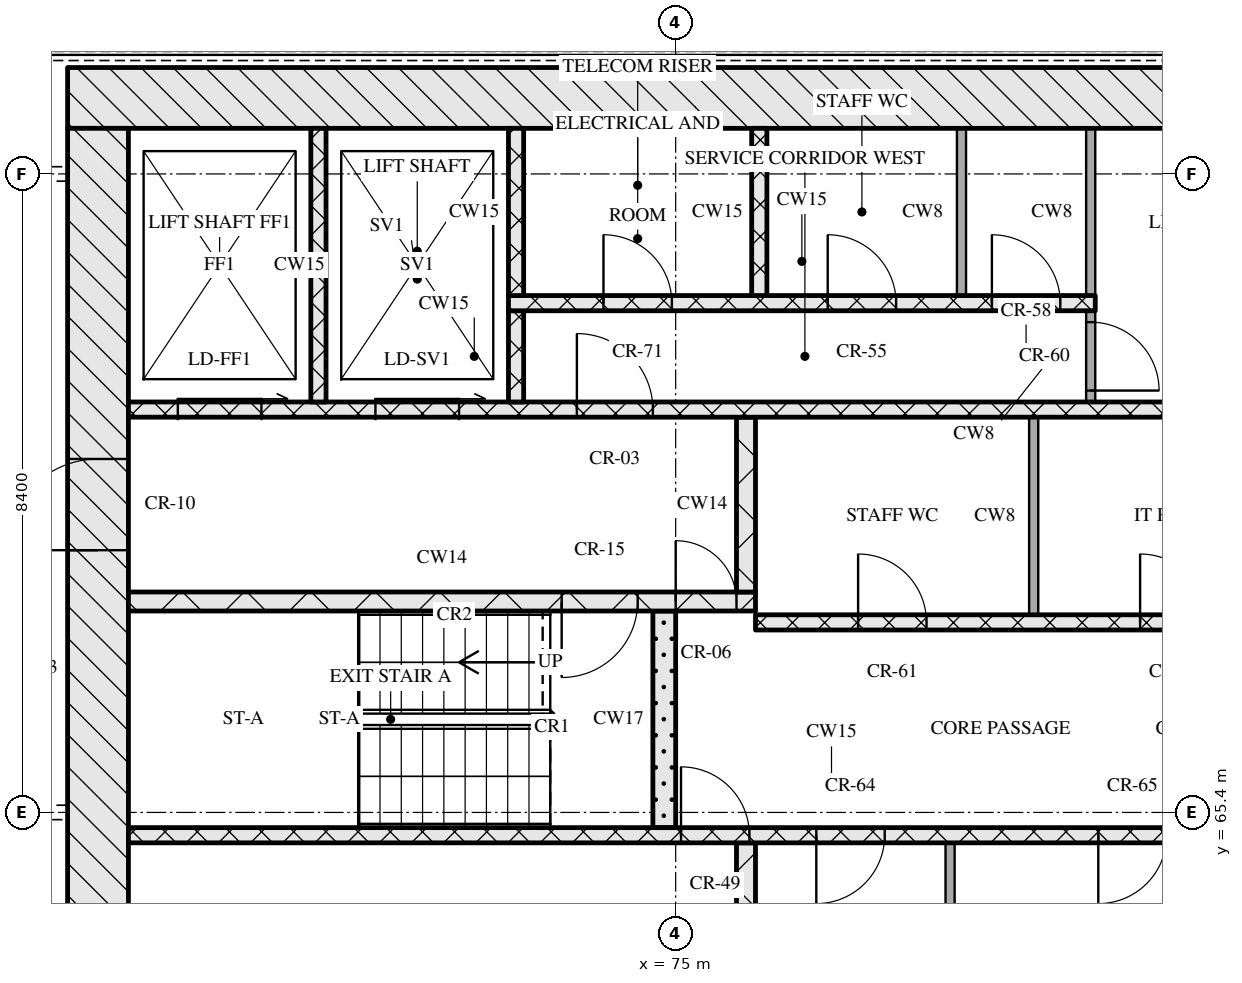
"""IFC4 building model, lengths in metres.
Left out: names, types, materials, properties, quantities, classifications, styles, units other than length and angle.
Written with IfcOpenShell. Run it as: python <this file> out.ifc"""

import sys

from ifc_helpers import new_model, si_unit, direction, frame, frame_2d, origin, place, context, subcontext, project, spatial, rectangle, extrude, element, fill, save


model = new_model("IFC4")
c1 = context("Model", 3, precision=1e-05, world=origin(), true_north=direction((0.0, 1.0)))
c2 = subcontext(c1, "Body", "Model", "MODEL_VIEW")
j1 = project(units=[si_unit("LENGTHUNIT", "METRE"), si_unit("PLANEANGLEUNIT", "RADIAN")], contexts=[c1])
p1 = place(None, origin())
s1 = spatial("IfcSite", under=j1, at=p1, CompositionType="ELEMENT")
p2 = place(p1, origin())
s2 = spatial("IfcBuilding", under=s1, at=p2, CompositionType="ELEMENT")
p3 = place(p2, frame((0.0, 0.0, 176.25)))
s3 = spatial("IfcBuildingStorey", under=s2, at=p3, CompositionType="ELEMENT", Elevation=176.25)
p4 = place(p3, frame((67.0, 74.8, 0.0), z_axis=(0.0, 0.0, 1.0), x_axis=(1.0, 0.0, 0.0)))
e1 = element("IfcWall", 1, at=p4, inside=s3, PredefinedType="SOLIDWALL", context=c2, shape_type="SweptSolid", body=[
    extrude(rectangle(XDim=41.2, YDim=0.8, at=frame_2d((20.6, 0.0))), origin(), (0.0, 0.0, 1.0), 3.32),
])
p5 = place(p3, frame((67.4, 62.4, 0.0), z_axis=(0.0, 0.0, 1.0), x_axis=(0.0, 1.0, 0.0)))
e2 = element("IfcWall", 2, at=p5, inside=s3, PredefinedType="SOLIDWALL", context=c2, shape_type="SweptSolid", body=[
    extrude(rectangle(XDim=12.0, YDim=0.8, at=frame_2d((6.0, 0.0))), origin(), (0.0, 0.0, 1.0), 3.32),
])
p6 = place(p5, frame((6.45, 0.0, 0.0)))
e3 = element("IfcOpeningElement", 3, at=p6, cuts=e2, PredefinedType="OPENING", context=c2, shape_type="SweptSolid", body=[
    extrude(rectangle(XDim=1.2, YDim=2.1, at=frame_2d((0.6, 1.05))), frame((0.0, 0.41, 0.0), z_axis=(0.0, -1.0, 0.0), x_axis=(1.0, 0.0, 0.0)), (0.0, 0.0, 1.0), 0.82),
])
p7 = place(p3, frame((75.925, 62.4, 0.0), z_axis=(0.0, 0.0, 1.0), x_axis=(0.0, 1.0, 0.0)))
e4 = element("IfcWall", 4, at=p7, inside=s3, PredefinedType="SOLIDWALL", context=c2, shape_type="SweptSolid", body=[
    extrude(rectangle(XDim=2.6, YDim=0.25, at=frame_2d((1.3, 0.0))), origin(), (0.0, 0.0, 1.0), 3.32),
])
p8 = place(p3, frame((78.61, 62.4, 0.0), z_axis=(0.0, 0.0, 1.0), x_axis=(0.0, 1.0, 0.0)))
e5 = element("IfcWall", 5, at=p8, inside=s3, PredefinedType="PARTITIONING", context=c2, shape_type="SweptSolid", body=[
    extrude(rectangle(XDim=2.6, YDim=0.12, at=frame_2d((1.3, 0.0))), origin(), (0.0, 0.0, 1.0), 3.32),
])
p9 = place(p3, frame((67.8, 65.1, 0.0), z_axis=(0.0, 0.0, 1.0), x_axis=(1.0, 0.0, 0.0)))
e6 = element("IfcWall", 6, at=p9, inside=s3, PredefinedType="SOLIDWALL", context=c2, shape_type="SweptSolid", body=[
    extrude(rectangle(XDim=18.5, YDim=0.2, at=frame_2d((9.25, 0.0))), origin(), (0.0, 0.0, 1.0), 3.32),
])
p10 = place(p9, frame((7.27, 0.0, 0.0)))
e7 = element("IfcOpeningElement", 7, at=p10, cuts=e6, PredefinedType="OPENING", context=c2, shape_type="SweptSolid", body=[
    extrude(rectangle(XDim=0.9, YDim=2.1, at=frame_2d((0.45, 1.05))), frame((0.0, 0.11, 0.0), z_axis=(0.0, -1.0, 0.0), x_axis=(1.0, 0.0, 0.0)), (0.0, 0.0, 1.0), 0.22),
])
p11 = place(p9, frame((9.05, 0.0, 0.0)))
e8 = element("IfcOpeningElement", 8, at=p11, cuts=e6, PredefinedType="OPENING", context=c2, shape_type="SweptSolid", body=[
    extrude(rectangle(XDim=0.9, YDim=2.1, at=frame_2d((0.45, 1.05))), frame((0.0, 0.11, 0.0), z_axis=(0.0, -1.0, 0.0), x_axis=(1.0, 0.0, 0.0)), (0.0, 0.0, 1.0), 0.22),
])
p12 = place(p9, frame((12.76, 0.0, 0.0)))
e9 = element("IfcOpeningElement", 9, at=p12, cuts=e6, PredefinedType="OPENING", context=c2, shape_type="SweptSolid", body=[
    extrude(rectangle(XDim=0.9, YDim=2.1, at=frame_2d((0.45, 1.05))), frame((0.0, 0.11, 0.0), z_axis=(0.0, -1.0, 0.0), x_axis=(1.0, 0.0, 0.0)), (0.0, 0.0, 1.0), 0.22),
])
p13 = place(p9, frame((16.7, 0.0, 0.0)))
e10 = element("IfcOpeningElement", 10, at=p13, cuts=e6, PredefinedType="OPENING", context=c2, shape_type="SweptSolid", body=[
    extrude(rectangle(XDim=0.9, YDim=2.1, at=frame_2d((0.45, 1.05))), frame((0.0, 0.11, 0.0), z_axis=(0.0, -1.0, 0.0), x_axis=(1.0, 0.0, 0.0)), (0.0, 0.0, 1.0), 0.22),
])
p14 = place(p3, frame((74.85, 65.2, 0.0), z_axis=(0.0, 0.0, 1.0), x_axis=(0.0, 1.0, 0.0)))
e11 = element("IfcWall", 11, at=p14, inside=s3, PredefinedType="SOLIDWALL", context=c2, shape_type="SweptSolid", body=[
    extrude(rectangle(XDim=2.85, YDim=0.3, at=frame_2d((1.425, 0.0))), origin(), (0.0, 0.0, 1.0), 3.32),
])
p15 = place(p3, frame((76.05, 67.9, 0.0), z_axis=(0.0, 0.0, 1.0), x_axis=(1.0, 0.0, 0.0)))
e12 = element("IfcWall", 12, at=p15, inside=s3, PredefinedType="SOLIDWALL", context=c2, shape_type="SweptSolid", body=[
    extrude(rectangle(XDim=23.1, YDim=0.2, at=frame_2d((11.55, 0.0))), origin(), (0.0, 0.0, 1.0), 3.32),
])
p16 = place(p15, frame((1.35, 0.0, 0.0)))
e13 = element("IfcOpeningElement", 13, at=p16, cuts=e12, PredefinedType="OPENING", context=c2, shape_type="SweptSolid", body=[
    extrude(rectangle(XDim=0.9, YDim=2.1, at=frame_2d((0.45, 1.05))), frame((0.0, 0.11, 0.0), z_axis=(0.0, -1.0, 0.0), x_axis=(1.0, 0.0, 0.0)), (0.0, 0.0, 1.0), 0.22),
])
p17 = place(p15, frame((5.06, 0.0, 0.0)))
e14 = element("IfcOpeningElement", 14, at=p17, cuts=e12, PredefinedType="OPENING", context=c2, shape_type="SweptSolid", body=[
    extrude(rectangle(XDim=0.9, YDim=2.1, at=frame_2d((0.45, 1.05))), frame((0.0, 0.11, 0.0), z_axis=(0.0, -1.0, 0.0), x_axis=(1.0, 0.0, 0.0)), (0.0, 0.0, 1.0), 0.22),
])
p18 = place(p15, frame((8.45, 0.0, 0.0)))
e15 = element("IfcOpeningElement", 15, at=p18, cuts=e12, PredefinedType="OPENING", context=c2, shape_type="SweptSolid", body=[
    extrude(rectangle(XDim=0.9, YDim=2.1, at=frame_2d((0.45, 1.05))), frame((0.0, 0.11, 0.0), z_axis=(0.0, -1.0, 0.0), x_axis=(1.0, 0.0, 0.0)), (0.0, 0.0, 1.0), 0.22),
])
p19 = place(p15, frame((10.91, 0.0, 0.0)))
e16 = element("IfcOpeningElement", 16, at=p19, cuts=e12, PredefinedType="OPENING", context=c2, shape_type="SweptSolid", body=[
    extrude(rectangle(XDim=0.9, YDim=2.1, at=frame_2d((0.45, 1.05))), frame((0.0, 0.11, 0.0), z_axis=(0.0, -1.0, 0.0), x_axis=(1.0, 0.0, 0.0)), (0.0, 0.0, 1.0), 0.22),
])
p20 = place(p15, frame((13.55, 0.0, 0.0)))
e17 = element("IfcOpeningElement", 17, at=p20, cuts=e12, PredefinedType="OPENING", context=c2, shape_type="SweptSolid", body=[
    extrude(rectangle(XDim=1.0, YDim=2.1, at=frame_2d((0.5, 1.05))), frame((0.0, 0.11, 0.0), z_axis=(0.0, -1.0, 0.0), x_axis=(1.0, 0.0, 0.0)), (0.0, 0.0, 1.0), 0.22),
])
p21 = place(p15, frame((16.2, 0.0, 0.0)))
e18 = element("IfcOpeningElement", 18, at=p21, cuts=e12, PredefinedType="OPENING", context=c2, shape_type="SweptSolid", body=[
    extrude(rectangle(XDim=1.1, YDim=2.1, at=frame_2d((0.55, 1.05))), frame((0.0, 0.11, 0.0), z_axis=(0.0, -1.0, 0.0), x_axis=(1.0, 0.0, 0.0)), (0.0, 0.0, 1.0), 0.22),
])
p22 = place(p15, frame((18.7, 0.0, 0.0)))
e19 = element("IfcOpeningElement", 19, at=p22, cuts=e12, PredefinedType="OPENING", context=c2, shape_type="SweptSolid", body=[
    extrude(rectangle(XDim=1.1, YDim=2.1, at=frame_2d((0.55, 1.05))), frame((0.0, 0.11, 0.0), z_axis=(0.0, -1.0, 0.0), x_axis=(1.0, 0.0, 0.0)), (0.0, 0.0, 1.0), 0.22),
])
p23 = place(p15, frame((21.2, 0.0, 0.0)))
e20 = element("IfcOpeningElement", 20, at=p23, cuts=e12, PredefinedType="OPENING", context=c2, shape_type="SweptSolid", body=[
    extrude(rectangle(XDim=1.1, YDim=2.1, at=frame_2d((0.55, 1.05))), frame((0.0, 0.11, 0.0), z_axis=(0.0, -1.0, 0.0), x_axis=(1.0, 0.0, 0.0)), (0.0, 0.0, 1.0), 0.22),
])
p24 = place(p3, frame((79.71, 68.0, 0.0), z_axis=(0.0, 0.0, 1.0), x_axis=(0.0, 1.0, 0.0)))
e21 = element("IfcWall", 21, at=p24, inside=s3, PredefinedType="PARTITIONING", context=c2, shape_type="SweptSolid", body=[
    extrude(rectangle(XDim=2.6, YDim=0.12, at=frame_2d((1.3, 0.0))), origin(), (0.0, 0.0, 1.0), 3.32),
])
p25 = place(p3, frame((67.8, 68.175, 0.0), z_axis=(0.0, 0.0, 1.0), x_axis=(1.0, 0.0, 0.0)))
e22 = element("IfcWall", 22, at=p25, inside=s3, PredefinedType="SOLIDWALL", context=c2, shape_type="SweptSolid", body=[
    extrude(rectangle(XDim=8.25, YDim=0.25, at=frame_2d((4.125, 0.0))), origin(), (0.0, 0.0, 1.0), 3.32),
])
p26 = place(p25, frame((5.7, 0.0, 0.0)))
e23 = element("IfcOpeningElement", 23, at=p26, cuts=e22, PredefinedType="OPENING", context=c2, shape_type="SweptSolid", body=[
    extrude(rectangle(XDim=1.0, YDim=2.1, at=frame_2d((0.5, 1.05))), frame((0.0, 0.135, 0.0), z_axis=(0.0, -1.0, 0.0), x_axis=(1.0, 0.0, 0.0)), (0.0, 0.0, 1.0), 0.27),
])
p27 = place(p25, frame((7.2, 0.0, 0.0)))
e24 = element("IfcOpeningElement", 24, at=p27, cuts=e22, PredefinedType="OPENING", context=c2, shape_type="SweptSolid", body=[
    extrude(rectangle(XDim=0.8, YDim=2.1, at=frame_2d((0.4, 1.05))), frame((0.0, 0.135, 0.0), z_axis=(0.0, -1.0, 0.0), x_axis=(1.0, 0.0, 0.0)), (0.0, 0.0, 1.0), 0.27),
])
p28 = place(p3, frame((75.925, 68.3, 0.0), z_axis=(0.0, 0.0, 1.0), x_axis=(0.0, 1.0, 0.0)))
e25 = element("IfcWall", 25, at=p28, inside=s3, PredefinedType="SOLIDWALL", context=c2, shape_type="SweptSolid", body=[
    extrude(rectangle(XDim=2.3, YDim=0.25, at=frame_2d((1.15, 0.0))), origin(), (0.0, 0.0, 1.0), 3.32),
])
p29 = place(p3, frame((67.8, 70.7, 0.0), z_axis=(0.0, 0.0, 1.0), x_axis=(1.0, 0.0, 0.0)))
e26 = element("IfcWall", 26, at=p29, inside=s3, PredefinedType="SOLIDWALL", context=c2, shape_type="SweptSolid", body=[
    extrude(rectangle(XDim=39.6, YDim=0.2, at=frame_2d((19.8, 0.0))), origin(), (0.0, 0.0, 1.0), 3.32),
])
p30 = place(p29, frame((0.65, 0.0, 0.0)))
e27 = element("IfcOpeningElement", 27, at=p30, cuts=e26, PredefinedType="OPENING", context=c2, shape_type="SweptSolid", body=[
    extrude(rectangle(XDim=1.1, YDim=2.1, at=frame_2d((0.55, 1.05))), frame((0.0, 0.11, 0.0), z_axis=(0.0, -1.0, 0.0), x_axis=(1.0, 0.0, 0.0)), (0.0, 0.0, 1.0), 0.22),
])
p31 = place(p29, frame((3.25, 0.0, 0.0)))
e28 = element("IfcOpeningElement", 28, at=p31, cuts=e26, PredefinedType="OPENING", context=c2, shape_type="SweptSolid", body=[
    extrude(rectangle(XDim=1.1, YDim=2.1, at=frame_2d((0.55, 1.05))), frame((0.0, 0.11, 0.0), z_axis=(0.0, -1.0, 0.0), x_axis=(1.0, 0.0, 0.0)), (0.0, 0.0, 1.0), 0.22),
])
p32 = place(p29, frame((5.9, 0.0, 0.0)))
e29 = element("IfcOpeningElement", 29, at=p32, cuts=e26, PredefinedType="OPENING", context=c2, shape_type="SweptSolid", body=[
    extrude(rectangle(XDim=1.0, YDim=2.1, at=frame_2d((0.5, 1.05))), frame((0.0, 0.11, 0.0), z_axis=(0.0, -1.0, 0.0), x_axis=(1.0, 0.0, 0.0)), (0.0, 0.0, 1.0), 0.22),
])
p33 = place(p29, frame((21.7, 0.0, 0.0)))
e30 = element("IfcOpeningElement", 30, at=p33, cuts=e26, PredefinedType="OPENING", context=c2, shape_type="SweptSolid", body=[
    extrude(rectangle(XDim=1.0, YDim=2.1, at=frame_2d((0.5, 1.05))), frame((0.0, 0.11, 0.0), z_axis=(0.0, -1.0, 0.0), x_axis=(1.0, 0.0, 0.0)), (0.0, 0.0, 1.0), 0.22),
])
p34 = place(p29, frame((32.7, 0.0, 0.0)))
e31 = element("IfcOpeningElement", 31, at=p34, cuts=e26, PredefinedType="OPENING", context=c2, shape_type="SweptSolid", body=[
    extrude(rectangle(XDim=1.0, YDim=2.1, at=frame_2d((0.5, 1.05))), frame((0.0, 0.11, 0.0), z_axis=(0.0, -1.0, 0.0), x_axis=(1.0, 0.0, 0.0)), (0.0, 0.0, 1.0), 0.22),
])
p35 = place(p29, frame((35.25, 0.0, 0.0)))
e32 = element("IfcOpeningElement", 32, at=p35, cuts=e26, PredefinedType="OPENING", context=c2, shape_type="SweptSolid", body=[
    extrude(rectangle(XDim=1.1, YDim=2.1, at=frame_2d((0.55, 1.05))), frame((0.0, 0.11, 0.0), z_axis=(0.0, -1.0, 0.0), x_axis=(1.0, 0.0, 0.0)), (0.0, 0.0, 1.0), 0.22),
])
p36 = place(p29, frame((37.85, 0.0, 0.0)))
e33 = element("IfcOpeningElement", 33, at=p36, cuts=e26, PredefinedType="OPENING", context=c2, shape_type="SweptSolid", body=[
    extrude(rectangle(XDim=1.1, YDim=2.1, at=frame_2d((0.55, 1.05))), frame((0.0, 0.11, 0.0), z_axis=(0.0, -1.0, 0.0), x_axis=(1.0, 0.0, 0.0)), (0.0, 0.0, 1.0), 0.22),
])
p37 = place(p3, frame((70.3, 70.8, 0.0), z_axis=(0.0, 0.0, 1.0), x_axis=(0.0, 1.0, 0.0)))
e34 = element("IfcWall", 34, at=p37, inside=s3, PredefinedType="SOLIDWALL", context=c2, shape_type="SweptSolid", body=[
    extrude(rectangle(XDim=3.6, YDim=0.2, at=frame_2d((1.8, 0.0))), origin(), (0.0, 0.0, 1.0), 3.32),
])
p38 = place(p3, frame((72.9, 70.8, 0.0), z_axis=(0.0, 0.0, 1.0), x_axis=(0.0, 1.0, 0.0)))
e35 = element("IfcWall", 35, at=p38, inside=s3, PredefinedType="SOLIDWALL", context=c2, shape_type="SweptSolid", body=[
    extrude(rectangle(XDim=1.2, YDim=0.2, at=frame_2d((0.6, 0.0))), origin(), (0.0, 0.0, 1.0), 3.32),
])
p39 = place(p3, frame((80.46, 70.8, 0.0), z_axis=(0.0, 0.0, 1.0), x_axis=(0.0, 1.0, 0.0)))
e36 = element("IfcWall", 36, at=p39, inside=s3, PredefinedType="PARTITIONING", context=c2, shape_type="SweptSolid", body=[
    extrude(rectangle(XDim=1.2, YDim=0.12, at=frame_2d((0.6, 0.0))), origin(), (0.0, 0.0, 1.0), 3.32),
])
p40 = place(p39, frame((0.15, 0.0, 0.0)))
e37 = element("IfcOpeningElement", 37, at=p40, cuts=e36, PredefinedType="OPENING", context=c2, shape_type="SweptSolid", body=[
    extrude(rectangle(XDim=0.9, YDim=2.1, at=frame_2d((0.45, 1.05))), frame((0.0, 0.07, 0.0), z_axis=(0.0, -1.0, 0.0), x_axis=(1.0, 0.0, 0.0)), (0.0, 0.0, 1.0), 0.14),
])
p41 = place(p3, frame((72.8, 72.1, 0.0), z_axis=(0.0, 0.0, 1.0), x_axis=(1.0, 0.0, 0.0)))
e38 = element("IfcWall", 38, at=p41, inside=s3, PredefinedType="SOLIDWALL", context=c2, shape_type="SweptSolid", body=[
    extrude(rectangle(XDim=7.72, YDim=0.2, at=frame_2d((3.86, 0.0))), origin(), (0.0, 0.0, 1.0), 3.32),
])
p42 = place(p41, frame((1.25, 0.0, 0.0)))
e39 = element("IfcOpeningElement", 39, at=p42, cuts=e38, PredefinedType="OPENING", context=c2, shape_type="SweptSolid", body=[
    extrude(rectangle(XDim=0.9, YDim=2.1, at=frame_2d((0.45, 1.05))), frame((0.0, 0.11, 0.0), z_axis=(0.0, -1.0, 0.0), x_axis=(1.0, 0.0, 0.0)), (0.0, 0.0, 1.0), 0.22),
])
p43 = place(p41, frame((4.2, 0.0, 0.0)))
e40 = element("IfcOpeningElement", 40, at=p43, cuts=e38, PredefinedType="OPENING", context=c2, shape_type="SweptSolid", body=[
    extrude(rectangle(XDim=0.9, YDim=2.1, at=frame_2d((0.45, 1.05))), frame((0.0, 0.11, 0.0), z_axis=(0.0, -1.0, 0.0), x_axis=(1.0, 0.0, 0.0)), (0.0, 0.0, 1.0), 0.22),
])
p44 = place(p41, frame((6.36, 0.0, 0.0)))
e41 = element("IfcOpeningElement", 41, at=p44, cuts=e38, PredefinedType="OPENING", context=c2, shape_type="SweptSolid", body=[
    extrude(rectangle(XDim=0.9, YDim=2.1, at=frame_2d((0.45, 1.05))), frame((0.0, 0.11, 0.0), z_axis=(0.0, -1.0, 0.0), x_axis=(1.0, 0.0, 0.0)), (0.0, 0.0, 1.0), 0.22),
])
for number, where, z_axis, x_axis in (
    (42, (72.9, 72.2, 0.0), (0.0, 0.0, 1.0), (0.0, 1.0, 0.0)),
    (43, (76.1, 72.2, 0.0), (0.0, 0.0, 1.0), (0.0, 1.0, 0.0)),
):
    element("IfcWall", number, at=place(p3, frame(where, z_axis=z_axis, x_axis=x_axis)), inside=s3, PredefinedType="SOLIDWALL", context=c2, shape_type="SweptSolid", body=[
        extrude(rectangle(XDim=2.2, YDim=0.2, at=frame_2d((1.1, 0.0))), origin(), (0.0, 0.0, 1.0), 3.32),
    ])
for number, where, z_axis, x_axis in (
    (44, (78.76, 72.2, 0.0), (0.0, 0.0, 1.0), (0.0, 1.0, 0.0)),
    (45, (80.46, 72.2, 0.0), (0.0, 0.0, 1.0), (0.0, 1.0, 0.0)),
):
    element("IfcWall", number, at=place(p3, frame(where, z_axis=z_axis, x_axis=x_axis)), inside=s3, PredefinedType="PARTITIONING", context=c2, shape_type="SweptSolid", body=[
        extrude(rectangle(XDim=2.2, YDim=0.12, at=frame_2d((1.1, 0.0))), origin(), (0.0, 0.0, 1.0), 3.32),
    ])
p45 = place(p10, origin())
e46 = element("IfcDoor", 46, at=p45, inside=s3, OperationType="SINGLE_SWING_LEFT", PredefinedType="DOOR", context=c2, shape_type="SweptSolid", body=[
    extrude(rectangle(XDim=0.9, YDim=2.1, at=frame_2d((0.45, 1.05))), frame((0.0, 0.025, 0.0), z_axis=(0.0, -1.0, 0.0), x_axis=(1.0, 0.0, 0.0)), (0.0, 0.0, 1.0), 0.05),
])
fill(e7, e46)
p46 = place(p11, origin())
e47 = element("IfcDoor", 47, at=p46, inside=s3, OperationType="SINGLE_SWING_RIGHT", PredefinedType="DOOR", context=c2, shape_type="SweptSolid", body=[
    extrude(rectangle(XDim=0.9, YDim=2.1, at=frame_2d((0.45, 1.05))), frame((0.0, 0.025, 0.0), z_axis=(0.0, -1.0, 0.0), x_axis=(1.0, 0.0, 0.0)), (0.0, 0.0, 1.0), 0.05),
])
fill(e8, e47)
p47 = place(p12, origin())
e48 = element("IfcDoor", 48, at=p47, inside=s3, OperationType="SINGLE_SWING_RIGHT", PredefinedType="DOOR", context=c2, shape_type="SweptSolid", body=[
    extrude(rectangle(XDim=0.9, YDim=2.1, at=frame_2d((0.45, 1.05))), frame((0.0, 0.025, 0.0), z_axis=(0.0, -1.0, 0.0), x_axis=(1.0, 0.0, 0.0)), (0.0, 0.0, 1.0), 0.05),
])
fill(e9, e48)
p48 = place(p16, origin())
e49 = element("IfcDoor", 49, at=p48, inside=s3, OperationType="SINGLE_SWING_LEFT", PredefinedType="DOOR", context=c2, shape_type="SweptSolid", body=[
    extrude(rectangle(XDim=0.9, YDim=2.1, at=frame_2d((0.45, 1.05))), frame((0.0, 0.025, 0.0), z_axis=(0.0, -1.0, 0.0), x_axis=(1.0, 0.0, 0.0)), (0.0, 0.0, 1.0), 0.05),
])
fill(e13, e49)
p49 = place(p17, origin())
e50 = element("IfcDoor", 50, at=p49, inside=s3, OperationType="SINGLE_SWING_LEFT", PredefinedType="DOOR", context=c2, shape_type="SweptSolid", body=[
    extrude(rectangle(XDim=0.9, YDim=2.1, at=frame_2d((0.45, 1.05))), frame((0.0, 0.025, 0.0), z_axis=(0.0, -1.0, 0.0), x_axis=(1.0, 0.0, 0.0)), (0.0, 0.0, 1.0), 0.05),
])
fill(e14, e50)
p50 = place(p26, origin())
e51 = element("IfcDoor", 51, at=p50, inside=s3, OperationType="SINGLE_SWING_RIGHT", PredefinedType="DOOR", context=c2, shape_type="SweptSolid", body=[
    extrude(rectangle(XDim=1.0, YDim=2.1, at=frame_2d((0.5, 1.05))), frame((0.0, 0.025, 0.0), z_axis=(0.0, -1.0, 0.0), x_axis=(1.0, 0.0, 0.0)), (0.0, 0.0, 1.0), 0.05),
])
fill(e23, e51)
p51 = place(p27, origin())
e52 = element("IfcDoor", 52, at=p51, inside=s3, OperationType="SINGLE_SWING_LEFT", PredefinedType="DOOR", context=c2, shape_type="SweptSolid", body=[
    extrude(rectangle(XDim=0.8, YDim=2.1, at=frame_2d((0.4, 1.05))), frame((0.0, 0.025, 0.0), z_axis=(0.0, -1.0, 0.0), x_axis=(1.0, 0.0, 0.0)), (0.0, 0.0, 1.0), 0.05),
])
fill(e24, e52)
p52 = place(p6, origin())
e53 = element("IfcDoor", 53, at=p52, inside=s3, OperationType="SINGLE_SWING_LEFT", PredefinedType="DOOR", context=c2, shape_type="SweptSolid", body=[
    extrude(rectangle(XDim=1.2, YDim=2.1, at=frame_2d((0.6, 1.05))), frame((0.0, 0.025, 0.0), z_axis=(0.0, -1.0, 0.0), x_axis=(1.0, 0.0, 0.0)), (0.0, 0.0, 1.0), 0.05),
])
fill(e3, e53)
p53 = place(p30, origin())
e54 = element("IfcDoor", 54, at=p53, inside=s3, OperationType="SLIDING_TO_RIGHT", PredefinedType="DOOR", context=c2, shape_type="SweptSolid", body=[
    extrude(rectangle(XDim=1.1, YDim=2.1, at=frame_2d((0.55, 1.05))), frame((0.0, 0.025, 0.0), z_axis=(0.0, -1.0, 0.0), x_axis=(1.0, 0.0, 0.0)), (0.0, 0.0, 1.0), 0.05),
])
fill(e27, e54)
p54 = place(p31, origin())
e55 = element("IfcDoor", 55, at=p54, inside=s3, OperationType="SLIDING_TO_RIGHT", PredefinedType="DOOR", context=c2, shape_type="SweptSolid", body=[
    extrude(rectangle(XDim=1.1, YDim=2.1, at=frame_2d((0.55, 1.05))), frame((0.0, 0.025, 0.0), z_axis=(0.0, -1.0, 0.0), x_axis=(1.0, 0.0, 0.0)), (0.0, 0.0, 1.0), 0.05),
])
fill(e28, e55)
p55 = place(p32, origin())
e56 = element("IfcDoor", 56, at=p55, inside=s3, OperationType="SINGLE_SWING_LEFT", PredefinedType="DOOR", context=c2, shape_type="SweptSolid", body=[
    extrude(rectangle(XDim=1.0, YDim=2.1, at=frame_2d((0.5, 1.05))), frame((0.0, 0.025, 0.0), z_axis=(0.0, -1.0, 0.0), x_axis=(1.0, 0.0, 0.0)), (0.0, 0.0, 1.0), 0.05),
])
fill(e29, e56)
p56 = place(p40, origin())
e57 = element("IfcDoor", 57, at=p56, inside=s3, OperationType="SINGLE_SWING_RIGHT", PredefinedType="DOOR", context=c2, shape_type="SweptSolid", body=[
    extrude(rectangle(XDim=0.9, YDim=2.1, at=frame_2d((0.45, 1.05))), frame((0.0, 0.025, 0.0), z_axis=(0.0, -1.0, 0.0), x_axis=(1.0, 0.0, 0.0)), (0.0, 0.0, 1.0), 0.05),
])
fill(e37, e57)
p57 = place(p42, origin())
e58 = element("IfcDoor", 58, at=p57, inside=s3, OperationType="SINGLE_SWING_LEFT", PredefinedType="DOOR", context=c2, shape_type="SweptSolid", body=[
    extrude(rectangle(XDim=0.9, YDim=2.1, at=frame_2d((0.45, 1.05))), frame((0.0, 0.025, 0.0), z_axis=(0.0, -1.0, 0.0), x_axis=(1.0, 0.0, 0.0)), (0.0, 0.0, 1.0), 0.05),
])
fill(e39, e58)
p58 = place(p43, origin())
e59 = element("IfcDoor", 59, at=p58, inside=s3, OperationType="SINGLE_SWING_LEFT", PredefinedType="DOOR", context=c2, shape_type="SweptSolid", body=[
    extrude(rectangle(XDim=0.9, YDim=2.1, at=frame_2d((0.45, 1.05))), frame((0.0, 0.025, 0.0), z_axis=(0.0, -1.0, 0.0), x_axis=(1.0, 0.0, 0.0)), (0.0, 0.0, 1.0), 0.05),
])
fill(e40, e59)
p59 = place(p44, origin())
e60 = element("IfcDoor", 60, at=p59, inside=s3, OperationType="SINGLE_SWING_LEFT", PredefinedType="DOOR", context=c2, shape_type="SweptSolid", body=[
    extrude(rectangle(XDim=0.9, YDim=2.1, at=frame_2d((0.45, 1.05))), frame((0.0, 0.025, 0.0), z_axis=(0.0, -1.0, 0.0), x_axis=(1.0, 0.0, 0.0)), (0.0, 0.0, 1.0), 0.05),
])
fill(e41, e60)
save(model, sys.argv[1])
